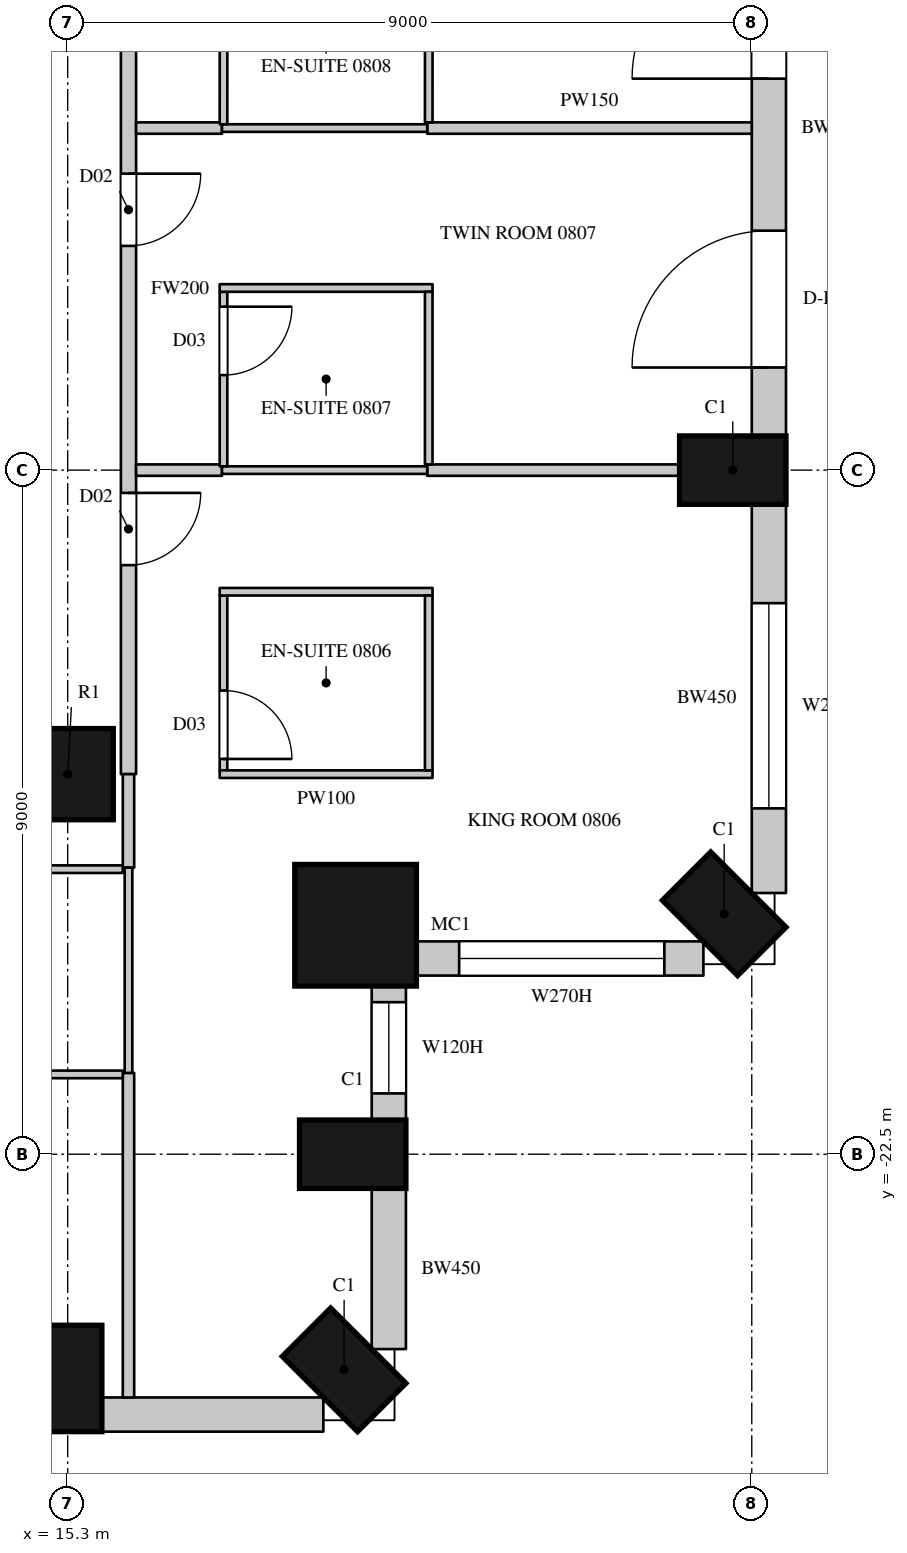
"""IFC4 building model, lengths in metres.
Left out: names, types, materials, properties, quantities, classifications, styles, units other than length and angle.
Written with IfcOpenShell. Run it as: python <this file> out.ifc"""

import sys

from ifc_helpers import new_model, si_unit, direction, frame, frame_2d, origin, origin_2d, place, context, subcontext, project, spatial, rectangle, circle, extrude, element, fill, save


model = new_model("IFC4")
c1 = context("Model", 3, precision=1e-05, world=origin(), true_north=direction((0.0, 1.0)))
c2 = subcontext(c1, "Body", "Model", "MODEL_VIEW")
j1 = project(units=[si_unit("LENGTHUNIT", "METRE"), si_unit("PLANEANGLEUNIT", "RADIAN")], contexts=[c1])
p1 = place(None, origin())
s1 = spatial("IfcSite", under=j1, at=p1, CompositionType="ELEMENT")
p2 = place(p1, origin())
s2 = spatial("IfcBuilding", under=s1, at=p2, CompositionType="ELEMENT")
p3 = place(p2, frame((0.0, 0.0, 59.1)))
s3 = spatial("IfcBuildingStorey", under=s2, at=p3, CompositionType="ELEMENT", Elevation=59.1)
for number, where, z_axis, x_axis in (
    (1, (15.3, -25.45, 0.0), (0.0, 0.0, 1.0), (1.0, 0.0, 0.0)),
    (2, (18.937, -25.337, 0.0), (0.0, 0.0, 1.0), (0.707, 0.707, 0.0)),
    (3, (19.05, -22.5, 0.0), (0.0, 0.0, 1.0), (0.0, 1.0, 0.0)),
):
    element("IfcColumn", number, at=place(p3, frame(where, z_axis=z_axis, x_axis=x_axis)), inside=s3, PredefinedType="COLUMN", context=c2, shape_type="SweptSolid", body=[
        extrude(rectangle(XDim=0.9, YDim=1.4, at=origin_2d()), origin(), (0.0, 0.0, 1.0), 3.6),
    ])
p4 = place(p3, frame((19.088, -19.488, 0.0), z_axis=(0.0, 0.0, 1.0), x_axis=(1.0, 0.0, 0.0)))
e4 = element("IfcColumn", 4, at=p4, inside=s3, PredefinedType="COLUMN", context=c2, shape_type="SweptSolid", body=[
    extrude(circle(Radius=0.8, at=origin_2d()), origin(), (0.0, 0.0, 1.0), 3.6),
])
for number, where, z_axis, x_axis in (
    (5, (23.937, -19.337, 0.0), (0.0, 0.0, 1.0), (0.707, 0.707, 0.0)),
    (6, (24.05, -13.5, 0.0), (0.0, 0.0, 1.0), (0.0, 1.0, 0.0)),
):
    element("IfcColumn", number, at=place(p3, frame(where, z_axis=z_axis, x_axis=x_axis)), inside=s3, PredefinedType="COLUMN", context=c2, shape_type="SweptSolid", body=[
        extrude(rectangle(XDim=0.9, YDim=1.4, at=origin_2d()), origin(), (0.0, 0.0, 1.0), 3.6),
    ])
p5 = place(p3, frame((15.3, -17.5, 0.0), z_axis=(0.0, 0.0, 1.0), x_axis=(1.0, 0.0, 0.0)))
e7 = element("IfcColumn", 7, at=p5, inside=s3, PredefinedType="COLUMN", context=c2, shape_type="SweptSolid", body=[
    extrude(circle(Radius=0.6, at=origin_2d()), origin(), (0.0, 0.0, 1.0), 3.6),
])
p6 = place(p3, frame((15.75, -25.925, 0.0), z_axis=(0.0, 0.0, 1.0), x_axis=(1.0, 0.0, 0.0)))
e8 = element("IfcWall", 8, at=p6, inside=s3, PredefinedType="SOLIDWALL", context=c2, shape_type="SweptSolid", body=[
    extrude(rectangle(XDim=2.914, YDim=0.45, at=frame_2d((1.457, 0.0))), origin(), (0.0, 0.0, 1.0), 3.3),
])
p7 = place(p3, frame((19.525, -25.064, 0.0), z_axis=(0.0, 0.0, 1.0), x_axis=(0.0, 1.0, 0.0)))
e9 = element("IfcWall", 9, at=p7, inside=s3, PredefinedType="SOLIDWALL", context=c2, shape_type="SweptSolid", body=[
    extrude(rectangle(XDim=2.114, YDim=0.45, at=frame_2d((1.057, 0.0))), origin(), (0.0, 0.0, 1.0), 3.3),
])
p8 = place(p3, frame((19.525, -22.05, 0.0), z_axis=(0.0, 0.0, 1.0), x_axis=(0.0, 1.0, 0.0)))
e10 = element("IfcWall", 10, at=p8, inside=s3, PredefinedType="SOLIDWALL", context=c2, shape_type="SweptSolid", body=[
    extrude(rectangle(XDim=1.792, YDim=0.45, at=frame_2d((0.896, 0.0))), origin(), (0.0, 0.0, 1.0), 3.3),
])
p9 = place(p8, frame((0.35, 0.0, 1.05)))
e11 = element("IfcOpeningElement", 11, at=p9, cuts=e10, PredefinedType="OPENING", context=c2, shape_type="SweptSolid", body=[
    extrude(rectangle(XDim=1.2, YDim=2.0, at=frame_2d((0.6, 1.0))), frame((0.0, 0.235, 0.0), z_axis=(0.0, -1.0, 0.0), x_axis=(1.0, 0.0, 0.0)), (0.0, 0.0, 1.0), 0.47),
])
p10 = place(p3, frame((19.858, -19.925, 0.0), z_axis=(0.0, 0.0, 1.0), x_axis=(1.0, 0.0, 0.0)))
e12 = element("IfcWall", 12, at=p10, inside=s3, PredefinedType="SOLIDWALL", context=c2, shape_type="SweptSolid", body=[
    extrude(rectangle(XDim=3.805, YDim=0.45, at=frame_2d((1.903, 0.0))), origin(), (0.0, 0.0, 1.0), 3.3),
])
p11 = place(p10, frame((0.592, 0.0, 1.05)))
e13 = element("IfcOpeningElement", 13, at=p11, cuts=e12, PredefinedType="OPENING", context=c2, shape_type="SweptSolid", body=[
    extrude(rectangle(XDim=2.7, YDim=2.0, at=frame_2d((1.35, 1.0))), frame((0.0, 0.235, 0.0), z_axis=(0.0, -1.0, 0.0), x_axis=(1.0, 0.0, 0.0)), (0.0, 0.0, 1.0), 0.47),
])
p12 = place(p3, frame((24.525, -19.064, 0.0), z_axis=(0.0, 0.0, 1.0), x_axis=(0.0, 1.0, 0.0)))
e14 = element("IfcWall", 14, at=p12, inside=s3, PredefinedType="SOLIDWALL", context=c2, shape_type="SweptSolid", body=[
    extrude(rectangle(XDim=5.114, YDim=0.45, at=frame_2d((2.557, 0.0))), origin(), (0.0, 0.0, 1.0), 3.3),
])
p13 = place(p12, frame((1.114, 0.0, 1.05)))
e15 = element("IfcOpeningElement", 15, at=p13, cuts=e14, PredefinedType="OPENING", context=c2, shape_type="SweptSolid", body=[
    extrude(rectangle(XDim=2.7, YDim=2.0, at=frame_2d((1.35, 1.0))), frame((0.0, 0.235, 0.0), z_axis=(0.0, -1.0, 0.0), x_axis=(1.0, 0.0, 0.0)), (0.0, 0.0, 1.0), 0.47),
])
p14 = place(p3, frame((24.525, -13.05, 0.0), z_axis=(0.0, 0.0, 1.0), x_axis=(0.0, 1.0, 0.0)))
e16 = element("IfcWall", 16, at=p14, inside=s3, PredefinedType="SOLIDWALL", context=c2, shape_type="SweptSolid", body=[
    extrude(rectangle(XDim=8.1, YDim=0.45, at=frame_2d((4.05, 0.0))), origin(), (0.0, 0.0, 1.0), 3.3),
])
p15 = place(p14, frame((0.9, 0.0, 0.0)))
e17 = element("IfcOpeningElement", 17, at=p15, cuts=e16, PredefinedType="OPENING", context=c2, shape_type="SweptSolid", body=[
    extrude(rectangle(XDim=1.8, YDim=2.4, at=frame_2d((0.9, 1.2))), frame((0.0, 0.235, 0.0), z_axis=(0.0, -1.0, 0.0), x_axis=(1.0, 0.0, 0.0)), (0.0, 0.0, 1.0), 0.47),
])
p16 = place(p14, frame((4.7, 0.0, 0.0)))
e18 = element("IfcOpeningElement", 18, at=p16, cuts=e16, PredefinedType="OPENING", context=c2, shape_type="SweptSolid", body=[
    extrude(rectangle(XDim=1.8, YDim=2.4, at=frame_2d((0.9, 1.2))), frame((0.0, 0.235, 0.0), z_axis=(0.0, -1.0, 0.0), x_axis=(1.0, 0.0, 0.0)), (0.0, 0.0, 1.0), 0.47),
])
p17 = place(p14, frame((6.7, 0.0, 1.05)))
e19 = element("IfcOpeningElement", 19, at=p17, cuts=e16, PredefinedType="OPENING", context=c2, shape_type="SweptSolid", body=[
    extrude(rectangle(XDim=1.2, YDim=2.0, at=frame_2d((0.6, 1.0))), frame((0.0, 0.235, 0.0), z_axis=(0.0, -1.0, 0.0), x_axis=(1.0, 0.0, 0.0)), (0.0, 0.0, 1.0), 0.47),
])
p18 = place(p3, frame((16.1, -17.5, 0.0), z_axis=(0.0, 0.0, 1.0), x_axis=(0.0, 1.0, 0.0)))
e20 = element("IfcWall", 20, at=p18, inside=s3, PredefinedType="PARTITIONING", context=c2, shape_type="SweptSolid", body=[
    extrude(rectangle(XDim=12.75, YDim=0.2, at=frame_2d((6.375, 0.0))), origin(), (0.0, 0.0, 1.0), 3.3),
])
p19 = place(p18, frame((2.75, 0.0, 0.0)))
e21 = element("IfcOpeningElement", 21, at=p19, cuts=e20, PredefinedType="OPENING", context=c2, shape_type="SweptSolid", body=[
    extrude(rectangle(XDim=0.95, YDim=2.2, at=frame_2d((0.475, 1.1))), frame((0.0, 0.11, 0.0), z_axis=(0.0, -1.0, 0.0), x_axis=(1.0, 0.0, 0.0)), (0.0, 0.0, 1.0), 0.22),
])
p20 = place(p18, frame((6.95, 0.0, 0.0)))
e22 = element("IfcOpeningElement", 22, at=p20, cuts=e20, PredefinedType="OPENING", context=c2, shape_type="SweptSolid", body=[
    extrude(rectangle(XDim=0.95, YDim=2.2, at=frame_2d((0.475, 1.1))), frame((0.0, 0.11, 0.0), z_axis=(0.0, -1.0, 0.0), x_axis=(1.0, 0.0, 0.0)), (0.0, 0.0, 1.0), 0.22),
])
p21 = place(p18, frame((11.4, 0.0, 0.0)))
e23 = element("IfcOpeningElement", 23, at=p21, cuts=e20, PredefinedType="OPENING", context=c2, shape_type="SweptSolid", body=[
    extrude(rectangle(XDim=0.95, YDim=2.2, at=frame_2d((0.475, 1.1))), frame((0.0, 0.11, 0.0), z_axis=(0.0, -1.0, 0.0), x_axis=(1.0, 0.0, 0.0)), (0.0, 0.0, 1.0), 0.22),
])
p22 = place(p3, frame((16.1, -25.7, 0.0), z_axis=(0.0, 0.0, 1.0), x_axis=(0.0, 1.0, 0.0)))
e24 = element("IfcWall", 24, at=p22, inside=s3, PredefinedType="PARTITIONING", context=c2, shape_type="SweptSolid", body=[
    extrude(rectangle(XDim=4.27, YDim=0.15, at=frame_2d((2.135, 0.0))), origin(), (0.0, 0.0, 1.0), 3.3),
])
p23 = place(p3, frame((16.1, -18.73, 0.0), z_axis=(0.0, 0.0, 1.0), x_axis=(0.0, 1.0, 0.0)))
e25 = element("IfcWall", 25, at=p23, inside=s3, PredefinedType="PARTITIONING", context=c2, shape_type="SweptSolid", body=[
    extrude(rectangle(XDim=1.23, YDim=0.15, at=frame_2d((0.615, 0.0))), origin(), (0.0, 0.0, 1.0), 3.3),
])
p24 = place(p3, frame((16.2, -13.5, 0.0), z_axis=(0.0, 0.0, 1.0), x_axis=(1.0, 0.0, 0.0)))
e26 = element("IfcWall", 26, at=p24, inside=s3, PredefinedType="PARTITIONING", context=c2, shape_type="SweptSolid", body=[
    extrude(rectangle(XDim=1.13, YDim=0.15, at=frame_2d((0.565, 0.0))), origin(), (0.0, 0.0, 1.0), 3.3),
])
p25 = place(p3, frame((16.2, -9.0, 0.0), z_axis=(0.0, 0.0, 1.0), x_axis=(1.0, 0.0, 0.0)))
e27 = element("IfcWall", 27, at=p25, inside=s3, PredefinedType="PARTITIONING", context=c2, shape_type="SweptSolid", body=[
    extrude(rectangle(XDim=1.13, YDim=0.15, at=frame_2d((0.565, 0.0))), origin(), (0.0, 0.0, 1.0), 2.65),
])
p26 = place(p3, frame((20.03, -13.5, 0.0), z_axis=(0.0, 0.0, 1.0), x_axis=(1.0, 0.0, 0.0)))
e28 = element("IfcWall", 28, at=p26, inside=s3, PredefinedType="PARTITIONING", context=c2, shape_type="SweptSolid", body=[
    extrude(rectangle(XDim=3.32, YDim=0.15, at=frame_2d((1.66, 0.0))), origin(), (0.0, 0.0, 1.0), 3.3),
])
p27 = place(p3, frame((20.03, -9.0, 0.0), z_axis=(0.0, 0.0, 1.0), x_axis=(1.0, 0.0, 0.0)))
e29 = element("IfcWall", 29, at=p27, inside=s3, PredefinedType="PARTITIONING", context=c2, shape_type="SweptSolid", body=[
    extrude(rectangle(XDim=4.27, YDim=0.15, at=frame_2d((2.135, 0.0))), origin(), (0.0, 0.0, 1.0), 2.65),
])
for number, where, z_axis, x_axis in (
    (30, (13.65, -21.45, 0.0), (0.0, 0.0, 1.0), (1.0, 0.0, 0.0)),
    (31, (13.65, -18.75, 0.0), (0.0, 0.0, 1.0), (1.0, 0.0, 0.0)),
):
    element("IfcWall", number, at=place(p3, frame(where, z_axis=z_axis, x_axis=x_axis)), inside=s3, PredefinedType="PARTITIONING", context=c2, shape_type="SweptSolid", body=[
        extrude(rectangle(XDim=2.375, YDim=0.1, at=frame_2d((1.188, 0.0))), origin(), (0.0, 0.0, 1.0), 3.3),
    ])
for number, where, z_axis, x_axis in (
    (32, (16.1, -21.43, 0.0), (0.0, 0.0, 1.0), (0.0, 1.0, 0.0)),
    (33, (17.33, -13.5, 0.0), (0.0, 0.0, 1.0), (1.0, 0.0, 0.0)),
):
    element("IfcWall", number, at=place(p3, frame(where, z_axis=z_axis, x_axis=x_axis)), inside=s3, PredefinedType="PARTITIONING", context=c2, shape_type="SweptSolid", body=[
        extrude(rectangle(XDim=2.7, YDim=0.1, at=frame_2d((1.35, 0.0))), origin(), (0.0, 0.0, 1.0), 3.3),
    ])
p28 = place(p3, frame((17.33, -9.0, 0.0), z_axis=(0.0, 0.0, 1.0), x_axis=(1.0, 0.0, 0.0)))
e34 = element("IfcWall", 34, at=p28, inside=s3, PredefinedType="PARTITIONING", context=c2, shape_type="SweptSolid", body=[
    extrude(rectangle(XDim=2.7, YDim=0.1, at=frame_2d((1.35, 0.0))), origin(), (0.0, 0.0, 1.0), 2.65),
])
p29 = place(p3, frame((17.35, -17.45, 0.0), z_axis=(0.0, 0.0, 1.0), x_axis=(0.0, 1.0, 0.0)))
e35 = element("IfcWall", 35, at=p29, inside=s3, PredefinedType="PARTITIONING", context=c2, shape_type="SweptSolid", body=[
    extrude(rectangle(XDim=2.3, YDim=0.1, at=frame_2d((1.15, 0.0))), origin(), (0.0, 0.0, 1.0), 3.3),
])
p30 = place(p29, frame((0.15, 0.0, 0.0)))
e36 = element("IfcOpeningElement", 36, at=p30, cuts=e35, PredefinedType="OPENING", context=c2, shape_type="SweptSolid", body=[
    extrude(rectangle(XDim=0.9, YDim=2.2, at=frame_2d((0.45, 1.1))), frame((0.0, 0.06, 0.0), z_axis=(0.0, -1.0, 0.0), x_axis=(1.0, 0.0, 0.0)), (0.0, 0.0, 1.0), 0.12),
])
for number, where, z_axis, x_axis in (
    (37, (17.3, -17.5, 0.0), (0.0, 0.0, 1.0), (1.0, 0.0, 0.0)),
    (38, (17.3, -15.1, 0.0), (0.0, 0.0, 1.0), (1.0, 0.0, 0.0)),
):
    element("IfcWall", number, at=place(p3, frame(where, z_axis=z_axis, x_axis=x_axis)), inside=s3, PredefinedType="PARTITIONING", context=c2, shape_type="SweptSolid", body=[
        extrude(rectangle(XDim=2.8, YDim=0.1, at=frame_2d((1.4, 0.0))), origin(), (0.0, 0.0, 1.0), 3.3),
    ])
p31 = place(p3, frame((17.35, -13.45, 0.0), z_axis=(0.0, 0.0, 1.0), x_axis=(0.0, 1.0, 0.0)))
e39 = element("IfcWall", 39, at=p31, inside=s3, PredefinedType="PARTITIONING", context=c2, shape_type="SweptSolid", body=[
    extrude(rectangle(XDim=2.296, YDim=0.1, at=frame_2d((1.148, 0.0))), origin(), (0.0, 0.0, 1.0), 3.3),
])
p32 = place(p31, frame((1.2, 0.0, 0.0)))
e40 = element("IfcOpeningElement", 40, at=p32, cuts=e39, PredefinedType="OPENING", context=c2, shape_type="SweptSolid", body=[
    extrude(rectangle(XDim=0.9, YDim=2.2, at=frame_2d((0.45, 1.1))), frame((0.0, 0.06, 0.0), z_axis=(0.0, -1.0, 0.0), x_axis=(1.0, 0.0, 0.0)), (0.0, 0.0, 1.0), 0.12),
])
p33 = place(p3, frame((17.3, -11.104, 0.0), z_axis=(0.0, 0.0, 1.0), x_axis=(1.0, 0.0, 0.0)))
e41 = element("IfcWall", 41, at=p33, inside=s3, PredefinedType="PARTITIONING", context=c2, shape_type="SweptSolid", body=[
    extrude(rectangle(XDim=2.8, YDim=0.1, at=frame_2d((1.4, 0.0))), origin(), (0.0, 0.0, 1.0), 3.3),
])
p34 = place(p3, frame((17.35, -8.95, 0.0), z_axis=(0.0, 0.0, 1.0), x_axis=(0.000407580973, 0.999999916939, 0.0)))
e42 = element("IfcWall", 42, at=p34, inside=s3, PredefinedType="PARTITIONING", context=c2, shape_type="SweptSolid", body=[
    extrude(rectangle(XDim=2.396, YDim=0.1, at=frame_2d((1.198, 0.0))), origin(), (0.0, 0.0, 1.0), 3.3),
])
p35 = place(p34, frame((1.25, 0.0, 0.0)))
e43 = element("IfcOpeningElement", 43, at=p35, cuts=e42, PredefinedType="OPENING", context=c2, shape_type="SweptSolid", body=[
    extrude(rectangle(XDim=0.9, YDim=2.2, at=frame_2d((0.45, 1.1))), frame((0.0, 0.06, 0.0), z_axis=(0.0, -1.0, 0.0), x_axis=(1.0, 0.0, 0.0)), (0.0, 0.0, 1.0), 0.12),
])
p36 = place(p3, frame((20.05, -17.45, 0.0), z_axis=(0.0, 0.0, 1.0), x_axis=(0.0, 1.0, 0.0)))
e44 = element("IfcWall", 44, at=p36, inside=s3, PredefinedType="PARTITIONING", context=c2, shape_type="SweptSolid", body=[
    extrude(rectangle(XDim=2.3, YDim=0.1, at=frame_2d((1.15, 0.0))), origin(), (0.0, 0.0, 1.0), 3.3),
])
p37 = place(p3, frame((20.05, -13.425, 0.0), z_axis=(0.0, 0.0, 1.0), x_axis=(0.0, 1.0, 0.0)))
e45 = element("IfcWall", 45, at=p37, inside=s3, PredefinedType="PARTITIONING", context=c2, shape_type="SweptSolid", body=[
    extrude(rectangle(XDim=2.271, YDim=0.1, at=frame_2d((1.135, 0.0))), origin(), (0.0, 0.0, 1.0), 3.3),
])
p38 = place(p3, frame((20.05, -8.925, 0.0), z_axis=(0.0, 0.0, 1.0), x_axis=(0.000430200003, 0.999999907464, 0.0)))
e46 = element("IfcWall", 46, at=p38, inside=s3, PredefinedType="PARTITIONING", context=c2, shape_type="SweptSolid", body=[
    extrude(rectangle(XDim=2.27, YDim=0.1, at=frame_2d((1.135, 0.0))), origin(), (0.0, 0.0, 1.0), 3.3),
])
p39 = place(p9, origin())
e47 = element("IfcWindow", 47, at=p39, inside=s3, PartitioningType="SINGLE_PANEL", PredefinedType="WINDOW", context=c2, shape_type="SweptSolid", body=[
    extrude(rectangle(XDim=1.2, YDim=2.0, at=frame_2d((0.6, 1.0))), frame((0.0, 0.135, 0.0), z_axis=(0.0, -1.0, 0.0), x_axis=(1.0, 0.0, 0.0)), (0.0, 0.0, 1.0), 0.06),
])
fill(e11, e47)
p40 = place(p11, origin())
e48 = element("IfcWindow", 48, at=p40, inside=s3, PartitioningType="SINGLE_PANEL", PredefinedType="WINDOW", context=c2, shape_type="SweptSolid", body=[
    extrude(rectangle(XDim=2.7, YDim=2.0, at=frame_2d((1.35, 1.0))), frame((0.0, 0.135, 0.0), z_axis=(0.0, -1.0, 0.0), x_axis=(1.0, 0.0, 0.0)), (0.0, 0.0, 1.0), 0.06),
])
fill(e13, e48)
p41 = place(p13, origin())
e49 = element("IfcWindow", 49, at=p41, inside=s3, PartitioningType="SINGLE_PANEL", PredefinedType="WINDOW", context=c2, shape_type="SweptSolid", body=[
    extrude(rectangle(XDim=2.7, YDim=2.0, at=frame_2d((1.35, 1.0))), frame((0.0, 0.135, 0.0), z_axis=(0.0, -1.0, 0.0), x_axis=(1.0, 0.0, 0.0)), (0.0, 0.0, 1.0), 0.06),
])
fill(e15, e49)
p42 = place(p15, origin())
e50 = element("IfcDoor", 50, at=p42, inside=s3, OperationType="SLIDING_TO_LEFT", PredefinedType="DOOR", context=c2, shape_type="SweptSolid", body=[
    extrude(rectangle(XDim=1.8, YDim=2.4, at=frame_2d((0.9, 1.2))), frame((0.0, 0.13, 0.0), z_axis=(0.0, -1.0, 0.0), x_axis=(1.0, 0.0, 0.0)), (0.0, 0.0, 1.0), 0.05),
])
fill(e17, e50)
p43 = place(p16, origin())
e51 = element("IfcDoor", 51, at=p43, inside=s3, OperationType="SLIDING_TO_LEFT", PredefinedType="DOOR", context=c2, shape_type="SweptSolid", body=[
    extrude(rectangle(XDim=1.8, YDim=2.4, at=frame_2d((0.9, 1.2))), frame((0.0, 0.13, 0.0), z_axis=(0.0, -1.0, 0.0), x_axis=(1.0, 0.0, 0.0)), (0.0, 0.0, 1.0), 0.05),
])
fill(e18, e51)
p44 = place(p19, origin())
e52 = element("IfcDoor", 52, at=p44, inside=s3, OperationType="SINGLE_SWING_LEFT", PredefinedType="DOOR", context=c2, shape_type="SweptSolid", body=[
    extrude(rectangle(XDim=0.95, YDim=2.2, at=frame_2d((0.475, 1.1))), frame((0.0, 0.025, 0.0), z_axis=(0.0, -1.0, 0.0), x_axis=(1.0, 0.0, 0.0)), (0.0, 0.0, 1.0), 0.05),
])
fill(e21, e52)
p45 = place(p30, origin())
e53 = element("IfcDoor", 53, at=p45, inside=s3, OperationType="SINGLE_SWING_RIGHT", PredefinedType="DOOR", context=c2, shape_type="SweptSolid", body=[
    extrude(rectangle(XDim=0.9, YDim=2.2, at=frame_2d((0.45, 1.1))), frame((0.0, 0.025, 0.0), z_axis=(0.0, -1.0, 0.0), x_axis=(1.0, 0.0, 0.0)), (0.0, 0.0, 1.0), 0.05),
])
fill(e36, e53)
p46 = place(p20, origin())
e54 = element("IfcDoor", 54, at=p46, inside=s3, OperationType="SINGLE_SWING_LEFT", PredefinedType="DOOR", context=c2, shape_type="SweptSolid", body=[
    extrude(rectangle(XDim=0.95, YDim=2.2, at=frame_2d((0.475, 1.1))), frame((0.0, 0.025, 0.0), z_axis=(0.0, -1.0, 0.0), x_axis=(1.0, 0.0, 0.0)), (0.0, 0.0, 1.0), 0.05),
])
fill(e22, e54)
p47 = place(p32, origin())
e55 = element("IfcDoor", 55, at=p47, inside=s3, OperationType="SINGLE_SWING_LEFT", PredefinedType="DOOR", context=c2, shape_type="SweptSolid", body=[
    extrude(rectangle(XDim=0.9, YDim=2.2, at=frame_2d((0.45, 1.1))), frame((0.0, 0.025, 0.0), z_axis=(0.0, -1.0, 0.0), x_axis=(1.0, 0.0, 0.0)), (0.0, 0.0, 1.0), 0.05),
])
fill(e40, e55)
save(model, sys.argv[1])
